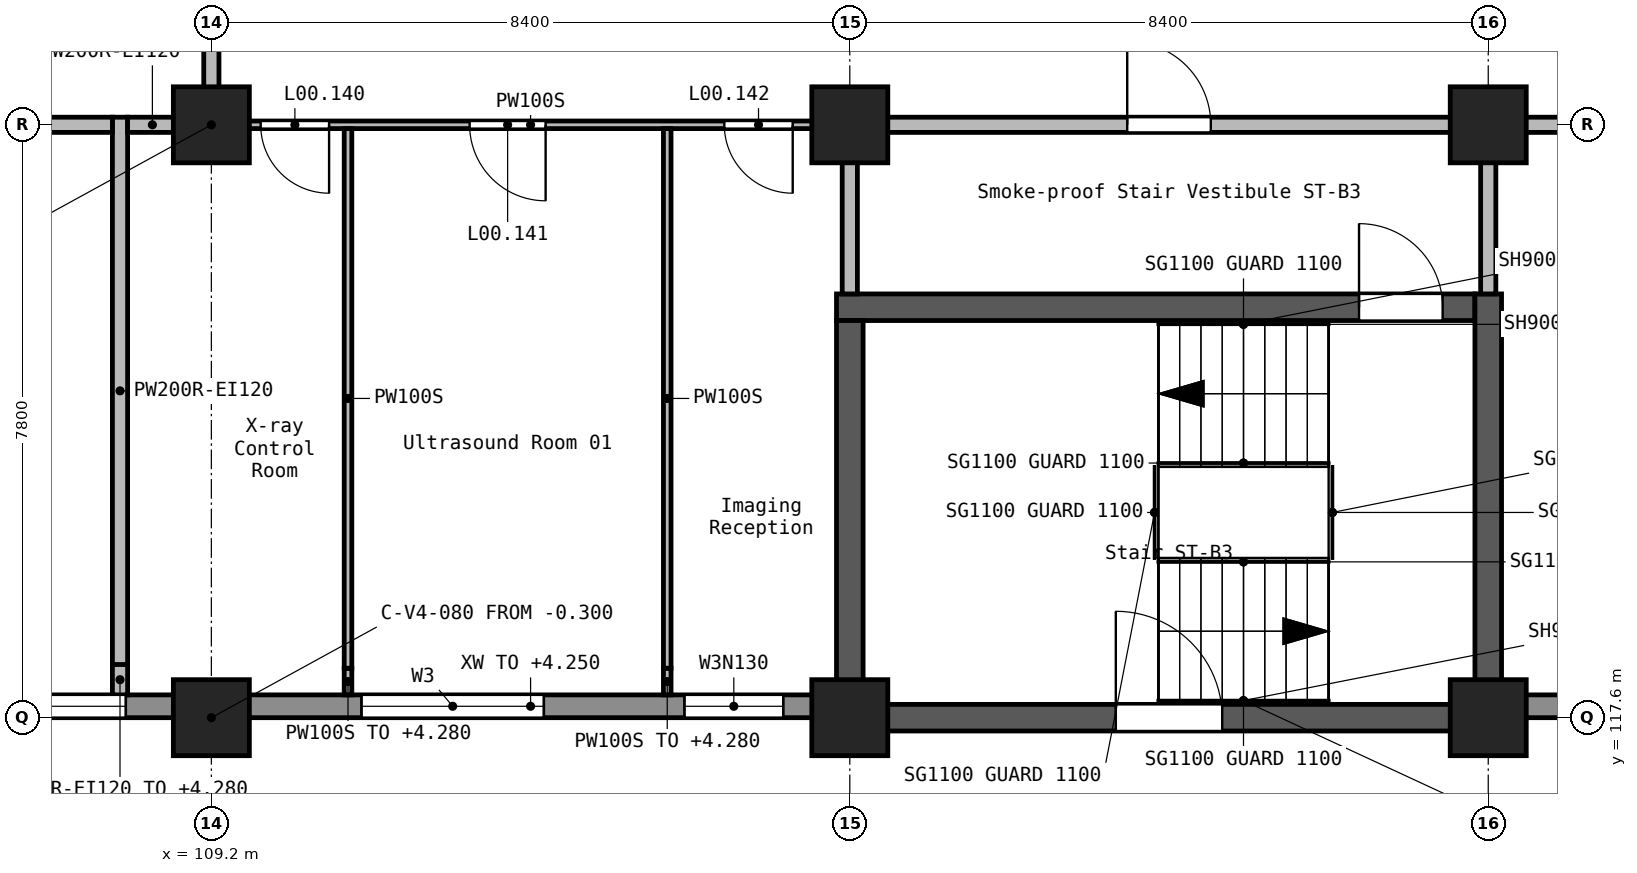
"""IFC4 building model, lengths in metres.
Left out: names, types, materials, properties, quantities, classifications, styles, units other than length and angle.
Written with IfcOpenShell. Run it as: python <this file> out.ifc"""

import sys

from ifc_helpers import new_model, si_unit, direction, frame, frame_2d, origin, origin_2d, place, context, subcontext, project, spatial, rectangle, extrude, element, fill, save


model = new_model("IFC4")
c1 = context("Model", 3, precision=1e-05, world=origin(), true_north=direction((0.0, 1.0)))
c2 = subcontext(c1, "Body", "Model", "MODEL_VIEW")
j1 = project(units=[si_unit("LENGTHUNIT", "METRE"), si_unit("PLANEANGLEUNIT", "RADIAN")], contexts=[c1])
p1 = place(None, origin())
s1 = spatial("IfcSite", under=j1, at=p1, CompositionType="ELEMENT")
p2 = place(p1, origin())
s2 = spatial("IfcBuilding", under=s1, at=p2, CompositionType="ELEMENT")
p3 = place(p2, origin())
s3 = spatial("IfcBuildingStorey", under=s2, at=p3, CompositionType="ELEMENT", Elevation=0.0)
for number, where, z_axis, x_axis in (
    (1, (109.2, 117.6, -0.3), (0.0, 0.0, 1.0), (1.0, 0.0, 0.0)),
    (2, (109.2, 125.4, -0.3), (0.0, 0.0, 1.0), (1.0, 0.0, 0.0)),
    (3, (117.6, 117.6, -0.3), (0.0, 0.0, 1.0), (1.0, 0.0, 0.0)),
    (4, (117.6, 125.4, -0.3), (0.0, 0.0, 1.0), (1.0, 0.0, 0.0)),
    (5, (126.0, 117.6, -0.3), (0.0, 0.0, 1.0), (1.0, 0.0, 0.0)),
    (6, (126.0, 125.4, -0.3), (0.0, 0.0, 1.0), (1.0, 0.0, 0.0)),
):
    element("IfcColumn", number, at=place(p3, frame(where, z_axis=z_axis, x_axis=x_axis)), inside=s3, PredefinedType="COLUMN", context=c2, shape_type="SweptSolid", body=[
        extrude(rectangle(XDim=1.0, YDim=1.0, at=origin_2d()), origin(), (0.0, 0.0, 1.0), 5.7),
    ])
p4 = place(p3, frame((117.425, 123.0, -0.3), z_axis=(0.0, 0.0, 1.0), x_axis=(1.0, 0.0, 0.0)))
e7 = element("IfcWall", 7, at=p4, inside=s3, PredefinedType="SHEAR", context=c2, shape_type="SweptSolid", body=[
    extrude(rectangle(XDim=8.4, YDim=0.35, at=frame_2d((4.2, 0.0))), origin(), (0.0, 0.0, 1.0), 5.7),
])
p5 = place(p4, frame((6.875, 0.0, 0.3)))
e8 = element("IfcOpeningElement", 8, at=p5, cuts=e7, PredefinedType="OPENING", context=c2, shape_type="SweptSolid", body=[
    extrude(rectangle(XDim=1.1, YDim=2.1, at=frame_2d((0.55, 1.05))), frame((0.0, 0.185, 0.0), z_axis=(0.0, -1.0, 0.0), x_axis=(1.0, 0.0, 0.0)), (0.0, 0.0, 1.0), 0.37),
])
p6 = place(p3, frame((117.6, 117.425, -0.3), z_axis=(0.0, 0.0, 1.0), x_axis=(0.0, 1.0, 0.0)))
e9 = element("IfcWall", 9, at=p6, inside=s3, PredefinedType="SHEAR", context=c2, shape_type="SweptSolid", body=[
    extrude(rectangle(XDim=5.4, YDim=0.35, at=frame_2d((2.7, 0.0))), origin(), (0.0, 0.0, 1.0), 5.7),
])
p7 = place(p3, frame((117.775, 117.6, -0.3), z_axis=(0.0, 0.0, 1.0), x_axis=(1.0, 0.0, 0.0)))
e10 = element("IfcWall", 10, at=p7, inside=s3, PredefinedType="SHEAR", context=c2, shape_type="SweptSolid", body=[
    extrude(rectangle(XDim=8.05, YDim=0.35, at=frame_2d((4.025, 0.0))), origin(), (0.0, 0.0, 1.0), 5.7),
])
p8 = place(p7, frame((3.325, 0.0, 0.3)))
e11 = element("IfcOpeningElement", 11, at=p8, cuts=e10, PredefinedType="OPENING", context=c2, shape_type="SweptSolid", body=[
    extrude(rectangle(XDim=1.4, YDim=2.1, at=frame_2d((0.7, 1.05))), frame((0.0, 0.185, 0.0), z_axis=(0.0, -1.0, 0.0), x_axis=(1.0, 0.0, 0.0)), (0.0, 0.0, 1.0), 0.37),
])
p9 = place(p3, frame((126.0, 117.425, -0.3), z_axis=(0.0, 0.0, 1.0), x_axis=(0.0, 1.0, 0.0)))
e12 = element("IfcWall", 12, at=p9, inside=s3, PredefinedType="SHEAR", context=c2, shape_type="SweptSolid", body=[
    extrude(rectangle(XDim=5.75, YDim=0.35, at=frame_2d((2.875, 0.0))), origin(), (0.0, 0.0, 1.0), 5.7),
])
p10 = place(p3, frame((101.25, 117.75, 0.0), z_axis=(0.0, 0.0, 1.0), x_axis=(1.0, 0.0, 0.0)))
e13 = element("IfcWall", 13, at=p10, inside=s3, PredefinedType="STANDARD", context=c2, shape_type="SweptSolid", body=[
    extrude(rectangle(XDim=7.5, YDim=0.3, at=frame_2d((3.75, 0.0))), origin(), (0.0, 0.0, 1.0), 4.25),
])
p11 = place(p10, frame((1.525, 0.0, 0.9)))
e14 = element("IfcOpeningElement", 14, at=p11, cuts=e13, PredefinedType="OPENING", context=c2, shape_type="SweptSolid", body=[
    extrude(rectangle(XDim=2.4, YDim=1.5, at=frame_2d((1.2, 0.75))), frame((0.0, 0.16, 0.0), z_axis=(0.0, -1.0, 0.0), x_axis=(1.0, 0.0, 0.0)), (0.0, 0.0, 1.0), 0.32),
])
p12 = place(p10, frame((4.425, 0.0, 0.9)))
e15 = element("IfcOpeningElement", 15, at=p12, cuts=e13, PredefinedType="OPENING", context=c2, shape_type="SweptSolid", body=[
    extrude(rectangle(XDim=2.4, YDim=1.5, at=frame_2d((1.2, 0.75))), frame((0.0, 0.16, 0.0), z_axis=(0.0, -1.0, 0.0), x_axis=(1.0, 0.0, 0.0)), (0.0, 0.0, 1.0), 0.32),
])
p13 = place(p3, frame((109.65, 117.75, 0.0), z_axis=(0.0, 0.0, 1.0), x_axis=(1.0, 0.0, 0.0)))
e16 = element("IfcWall", 16, at=p13, inside=s3, PredefinedType="STANDARD", context=c2, shape_type="SweptSolid", body=[
    extrude(rectangle(XDim=7.5, YDim=0.3, at=frame_2d((3.75, 0.0))), origin(), (0.0, 0.0, 1.0), 4.25),
])
p14 = place(p13, frame((1.525, 0.0, 0.9)))
e17 = element("IfcOpeningElement", 17, at=p14, cuts=e16, PredefinedType="OPENING", context=c2, shape_type="SweptSolid", body=[
    extrude(rectangle(XDim=2.4, YDim=1.5, at=frame_2d((1.2, 0.75))), frame((0.0, 0.16, 0.0), z_axis=(0.0, -1.0, 0.0), x_axis=(1.0, 0.0, 0.0)), (0.0, 0.0, 1.0), 0.32),
])
p15 = place(p13, frame((5.774, 0.0, 0.9)))
e18 = element("IfcOpeningElement", 18, at=p15, cuts=e16, PredefinedType="OPENING", context=c2, shape_type="SweptSolid", body=[
    extrude(rectangle(XDim=1.3, YDim=1.5, at=frame_2d((0.65, 0.75))), frame((0.0, 0.16, 0.0), z_axis=(0.0, -1.0, 0.0), x_axis=(1.0, 0.0, 0.0)), (0.0, 0.0, 1.0), 0.32),
])
p16 = place(p3, frame((126.45, 117.75, 0.0), z_axis=(0.0, 0.0, 1.0), x_axis=(1.0, 0.0, 0.0)))
e19 = element("IfcWall", 19, at=p16, inside=s3, PredefinedType="STANDARD", context=c2, shape_type="SweptSolid", body=[
    extrude(rectangle(XDim=7.5, YDim=0.3, at=frame_2d((3.75, 0.0))), origin(), (0.0, 0.0, 1.0), 4.25),
])
p17 = place(p16, frame((0.675, 0.0, 0.9)))
e20 = element("IfcOpeningElement", 20, at=p17, cuts=e19, PredefinedType="OPENING", context=c2, shape_type="SweptSolid", body=[
    extrude(rectangle(XDim=2.4, YDim=1.5, at=frame_2d((1.2, 0.75))), frame((0.0, 0.16, 0.0), z_axis=(0.0, -1.0, 0.0), x_axis=(1.0, 0.0, 0.0)), (0.0, 0.0, 1.0), 0.32),
])
p18 = place(p16, frame((4.425, 0.0, 0.9)))
e21 = element("IfcOpeningElement", 21, at=p18, cuts=e19, PredefinedType="OPENING", context=c2, shape_type="SweptSolid", body=[
    extrude(rectangle(XDim=2.4, YDim=1.5, at=frame_2d((1.2, 0.75))), frame((0.0, 0.16, 0.0), z_axis=(0.0, -1.0, 0.0), x_axis=(1.0, 0.0, 0.0)), (0.0, 0.0, 1.0), 0.32),
])
p19 = place(p3, frame((109.2, 128.55, 0.0), z_axis=(0.0, 0.0, 1.0), x_axis=(0.0, -1.0, 0.0)))
e22 = element("IfcWall", 22, at=p19, inside=s3, PredefinedType="SOLIDWALL", context=c2, shape_type="SweptSolid", body=[
    extrude(rectangle(XDim=2.7, YDim=0.2, at=frame_2d((1.35, 0.0))), origin(), (0.0, 0.0, 1.0), 5.05),
])
p20 = place(p3, frame((118.05, 125.4, 0.0), z_axis=(0.0, 0.0, 1.0), x_axis=(1.0, 0.0, 0.0)))
e23 = element("IfcWall", 23, at=p20, inside=s3, PredefinedType="SOLIDWALL", context=c2, shape_type="SweptSolid", body=[
    extrude(rectangle(XDim=7.5, YDim=0.2, at=frame_2d((3.75, 0.0))), origin(), (0.0, 0.0, 1.0), 5.05),
])
p21 = place(p20, frame((3.2, 0.0, 0.0)))
e24 = element("IfcOpeningElement", 24, at=p21, cuts=e23, PredefinedType="OPENING", context=c2, shape_type="SweptSolid", body=[
    extrude(rectangle(XDim=1.1, YDim=2.1, at=frame_2d((0.55, 1.05))), frame((0.0, 0.11, 0.0), z_axis=(0.0, -1.0, 0.0), x_axis=(1.0, 0.0, 0.0)), (0.0, 0.0, 1.0), 0.22),
])
p22 = place(p3, frame((107.998, 117.9, 0.0), z_axis=(0.0, 0.0, 1.0), x_axis=(0.0, 1.0, 0.0)))
e25 = element("IfcWall", 25, at=p22, inside=s3, PredefinedType="SOLIDWALL", context=c2, shape_type="SweptSolid", body=[
    extrude(rectangle(XDim=0.4, YDim=0.2, at=frame_2d((0.2, 0.0))), origin(), (0.0, 0.0, 1.0), 4.28),
])
p23 = place(p3, frame((107.998, 118.3, 0.0), z_axis=(0.0, 0.0, 1.0), x_axis=(0.0, 1.0, 0.0)))
e26 = element("IfcWall", 26, at=p23, inside=s3, PredefinedType="SOLIDWALL", context=c2, shape_type="SweptSolid", body=[
    extrude(rectangle(XDim=7.2, YDim=0.2, at=frame_2d((3.6, 0.0))), origin(), (0.0, 0.0, 1.0), 5.05),
])
for number, where, z_axis, x_axis in (
    (27, (117.6, 123.175, 0.0), (0.0, 0.0, 1.0), (0.0, 1.0, 0.0)),
    (28, (126.0, 123.175, 0.0), (0.0, 0.0, 1.0), (0.0, 1.0, 0.0)),
):
    element("IfcWall", number, at=place(p3, frame(where, z_axis=z_axis, x_axis=x_axis)), inside=s3, PredefinedType="SOLIDWALL", context=c2, shape_type="SweptSolid", body=[
        extrude(rectangle(XDim=1.775, YDim=0.2, at=frame_2d((0.887, 0.0))), origin(), (0.0, 0.0, 1.0), 5.05),
    ])
p24 = place(p3, frame((108.098, 125.4, 0.0), z_axis=(0.0, 0.0, 1.0), x_axis=(1.0, 0.0, 0.0)))
e29 = element("IfcWall", 29, at=p24, inside=s3, PredefinedType="SOLIDWALL", context=c2, shape_type="SweptSolid", body=[
    extrude(rectangle(XDim=0.652, YDim=0.2, at=frame_2d((0.326, 0.0))), origin(), (0.0, 0.0, 1.0), 5.05),
])
p25 = place(p3, frame((126.45, 125.4, 0.0), z_axis=(0.0, 0.0, 1.0), x_axis=(1.0, 0.0, 0.0)))
e30 = element("IfcWall", 30, at=p25, inside=s3, PredefinedType="SOLIDWALL", context=c2, shape_type="SweptSolid", body=[
    extrude(rectangle(XDim=7.5, YDim=0.2, at=frame_2d((3.75, 0.0))), origin(), (0.0, 0.0, 1.0), 5.05),
])
p26 = place(p25, frame((3.25, 0.0, 0.0)))
e31 = element("IfcOpeningElement", 31, at=p26, cuts=e30, PredefinedType="OPENING", context=c2, shape_type="SweptSolid", body=[
    extrude(rectangle(XDim=1.0, YDim=2.1, at=frame_2d((0.5, 1.05))), frame((0.0, 0.11, 0.0), z_axis=(0.0, -1.0, 0.0), x_axis=(1.0, 0.0, 0.0)), (0.0, 0.0, 1.0), 0.22),
])
p27 = place(p3, frame((102.698, 125.4, 0.0), z_axis=(0.0, 0.0, 1.0), x_axis=(1.0, 0.0, 0.0)))
e32 = element("IfcWall", 32, at=p27, inside=s3, PredefinedType="SOLIDWALL", context=c2, shape_type="SweptSolid", body=[
    extrude(rectangle(XDim=5.2, YDim=0.2, at=frame_2d((2.6, 0.0))), origin(), (0.0, 0.0, 1.0), 5.05),
])
p28 = place(p27, frame((2.1, 0.0, 0.0)))
e33 = element("IfcOpeningElement", 33, at=p28, cuts=e32, PredefinedType="OPENING", context=c2, shape_type="SweptSolid", body=[
    extrude(rectangle(XDim=1.0, YDim=2.1, at=frame_2d((0.5, 1.05))), frame((0.0, 0.11, 0.0), z_axis=(0.0, -1.0, 0.0), x_axis=(1.0, 0.0, 0.0)), (0.0, 0.0, 1.0), 0.22),
])
p29 = place(p3, frame((117.15, 125.4, 0.0), z_axis=(0.0, 0.0, 1.0), x_axis=(-1.0, 0.0, 0.0)))
e34 = element("IfcWall", 34, at=p29, inside=s3, PredefinedType="PARTITIONING", context=c2, shape_type="SweptSolid", body=[
    extrude(rectangle(XDim=7.5, YDim=0.1, at=frame_2d((3.75, 0.0))), origin(), (0.0, 0.0, 1.0), 5.05),
])
p30 = place(p29, frame((6.401, 0.0, 0.0)))
e35 = element("IfcOpeningElement", 35, at=p30, cuts=e34, PredefinedType="OPENING", context=c2, shape_type="SweptSolid", body=[
    extrude(rectangle(XDim=0.9, YDim=2.1, at=frame_2d((0.45, 1.05))), frame((0.0, 0.06, 0.0), z_axis=(0.0, -1.0, 0.0), x_axis=(1.0, 0.0, 0.0)), (0.0, 0.0, 1.0), 0.12),
])
p31 = place(p29, frame((3.552, 0.0, 0.0)))
e36 = element("IfcOpeningElement", 36, at=p31, cuts=e34, PredefinedType="OPENING", context=c2, shape_type="SweptSolid", body=[
    extrude(rectangle(XDim=1.0, YDim=2.1, at=frame_2d((0.5, 1.05))), frame((0.0, 0.06, 0.0), z_axis=(0.0, -1.0, 0.0), x_axis=(1.0, 0.0, 0.0)), (0.0, 0.0, 1.0), 0.12),
])
p32 = place(p29, frame((0.301, 0.0, 0.0)))
e37 = element("IfcOpeningElement", 37, at=p32, cuts=e34, PredefinedType="OPENING", context=c2, shape_type="SweptSolid", body=[
    extrude(rectangle(XDim=0.9, YDim=2.1, at=frame_2d((0.45, 1.05))), frame((0.0, 0.06, 0.0), z_axis=(0.0, -1.0, 0.0), x_axis=(1.0, 0.0, 0.0)), (0.0, 0.0, 1.0), 0.12),
])
p33 = place(p3, frame((110.998, 117.9, 0.0), z_axis=(0.0, 0.0, 1.0), x_axis=(0.0, 1.0, 0.0)))
e38 = element("IfcWall", 38, at=p33, inside=s3, PredefinedType="PARTITIONING", context=c2, shape_type="SweptSolid", body=[
    extrude(rectangle(XDim=0.35, YDim=0.1, at=frame_2d((0.175, 0.0))), origin(), (0.0, 0.0, 1.0), 4.28),
])
p34 = place(p3, frame((110.998, 118.25, 0.0), z_axis=(0.0, 0.0, 1.0), x_axis=(0.0, 1.0, 0.0)))
e39 = element("IfcWall", 39, at=p34, inside=s3, PredefinedType="PARTITIONING", context=c2, shape_type="SweptSolid", body=[
    extrude(rectangle(XDim=7.1, YDim=0.1, at=frame_2d((3.55, 0.0))), origin(), (0.0, 0.0, 1.0), 5.05),
])
p35 = place(p3, frame((115.198, 117.9, 0.0), z_axis=(0.0, 0.0, 1.0), x_axis=(0.0, 1.0, 0.0)))
e40 = element("IfcWall", 40, at=p35, inside=s3, PredefinedType="PARTITIONING", context=c2, shape_type="SweptSolid", body=[
    extrude(rectangle(XDim=0.35, YDim=0.1, at=frame_2d((0.175, 0.0))), origin(), (0.0, 0.0, 1.0), 4.28),
])
p36 = place(p3, frame((115.198, 118.25, 0.0), z_axis=(0.0, 0.0, 1.0), x_axis=(0.0, 1.0, 0.0)))
e41 = element("IfcWall", 41, at=p36, inside=s3, PredefinedType="PARTITIONING", context=c2, shape_type="SweptSolid", body=[
    extrude(rectangle(XDim=7.1, YDim=0.1, at=frame_2d((3.55, 0.0))), origin(), (0.0, 0.0, 1.0), 5.05),
])
p37 = place(p8, frame((1.4, 0.0, 0.0), z_axis=(0.0, 0.0, 1.0), x_axis=(-1.0, 0.0, 0.0)))
e42 = element("IfcDoor", 42, at=p37, inside=s3, OperationType="SINGLE_SWING_LEFT", PredefinedType="DOOR", context=c2, shape_type="SweptSolid", body=[
    extrude(rectangle(XDim=1.4, YDim=2.1, at=frame_2d((0.7, 1.05))), frame((0.0, 0.025, 0.0), z_axis=(0.0, -1.0, 0.0), x_axis=(1.0, 0.0, 0.0)), (0.0, 0.0, 1.0), 0.05),
])
fill(e11, e42)
p38 = place(p12, origin())
e43 = element("IfcWindow", 43, at=p38, inside=s3, PartitioningType="SINGLE_PANEL", PredefinedType="WINDOW", context=c2, shape_type="SweptSolid", body=[
    extrude(rectangle(XDim=2.4, YDim=1.5, at=frame_2d((1.2, 0.75))), frame((0.0, 0.03, 0.0), z_axis=(0.0, -1.0, 0.0), x_axis=(1.0, 0.0, 0.0)), (0.0, 0.0, 1.0), 0.06),
])
fill(e15, e43)
p39 = place(p14, origin())
e44 = element("IfcWindow", 44, at=p39, inside=s3, PartitioningType="SINGLE_PANEL", PredefinedType="WINDOW", context=c2, shape_type="SweptSolid", body=[
    extrude(rectangle(XDim=2.4, YDim=1.5, at=frame_2d((1.2, 0.75))), frame((0.0, 0.03, 0.0), z_axis=(0.0, -1.0, 0.0), x_axis=(1.0, 0.0, 0.0)), (0.0, 0.0, 1.0), 0.06),
])
fill(e17, e44)
p40 = place(p15, origin())
e45 = element("IfcWindow", 45, at=p40, inside=s3, PartitioningType="SINGLE_PANEL", PredefinedType="WINDOW", context=c2, shape_type="SweptSolid", body=[
    extrude(rectangle(XDim=1.3, YDim=1.5, at=frame_2d((0.65, 0.75))), frame((0.0, 0.03, 0.0), z_axis=(0.0, -1.0, 0.0), x_axis=(1.0, 0.0, 0.0)), (0.0, 0.0, 1.0), 0.06),
])
fill(e18, e45)
p41 = place(p5, frame((1.1, 0.0, 0.0), z_axis=(0.0, 0.0, 1.0), x_axis=(-1.0, 0.0, 0.0)))
e46 = element("IfcDoor", 46, at=p41, inside=s3, OperationType="SINGLE_SWING_LEFT", PredefinedType="DOOR", context=c2, shape_type="SweptSolid", body=[
    extrude(rectangle(XDim=1.1, YDim=2.1, at=frame_2d((0.55, 1.05))), frame((0.0, 0.025, 0.0), z_axis=(0.0, -1.0, 0.0), x_axis=(1.0, 0.0, 0.0)), (0.0, 0.0, 1.0), 0.05),
])
fill(e8, e46)
p42 = place(p21, frame((1.1, 0.0, 0.0), z_axis=(0.0, 0.0, 1.0), x_axis=(-1.0, 0.0, 0.0)))
e47 = element("IfcDoor", 47, at=p42, inside=s3, OperationType="SINGLE_SWING_LEFT", PredefinedType="DOOR", context=c2, shape_type="SweptSolid", body=[
    extrude(rectangle(XDim=1.1, YDim=2.1, at=frame_2d((0.55, 1.05))), frame((0.0, 0.025, 0.0), z_axis=(0.0, -1.0, 0.0), x_axis=(1.0, 0.0, 0.0)), (0.0, 0.0, 1.0), 0.05),
])
fill(e24, e47)
p43 = place(p30, origin())
e48 = element("IfcDoor", 48, at=p43, inside=s3, OperationType="SINGLE_SWING_RIGHT", PredefinedType="DOOR", context=c2, shape_type="SweptSolid", body=[
    extrude(rectangle(XDim=0.9, YDim=2.1, at=frame_2d((0.45, 1.05))), frame((0.0, 0.025, 0.0), z_axis=(0.0, -1.0, 0.0), x_axis=(1.0, 0.0, 0.0)), (0.0, 0.0, 1.0), 0.05),
])
fill(e35, e48)
p44 = place(p31, origin())
e49 = element("IfcDoor", 49, at=p44, inside=s3, OperationType="SINGLE_SWING_RIGHT", PredefinedType="DOOR", context=c2, shape_type="SweptSolid", body=[
    extrude(rectangle(XDim=1.0, YDim=2.1, at=frame_2d((0.5, 1.05))), frame((0.0, 0.025, 0.0), z_axis=(0.0, -1.0, 0.0), x_axis=(1.0, 0.0, 0.0)), (0.0, 0.0, 1.0), 0.05),
])
fill(e36, e49)
p45 = place(p32, origin())
e50 = element("IfcDoor", 50, at=p45, inside=s3, OperationType="SINGLE_SWING_LEFT", PredefinedType="DOOR", context=c2, shape_type="SweptSolid", body=[
    extrude(rectangle(XDim=0.9, YDim=2.1, at=frame_2d((0.45, 1.05))), frame((0.0, 0.025, 0.0), z_axis=(0.0, -1.0, 0.0), x_axis=(1.0, 0.0, 0.0)), (0.0, 0.0, 1.0), 0.05),
])
fill(e37, e50)
save(model, sys.argv[1])
